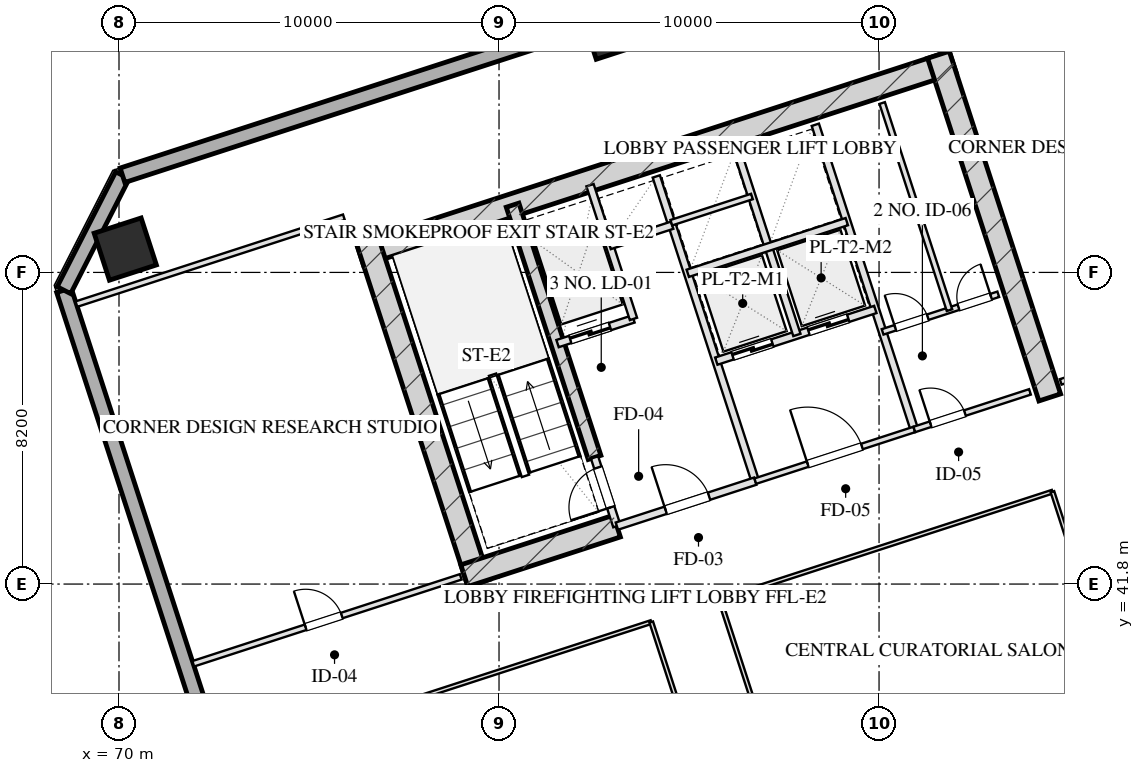
"""IFC4 building model, lengths in metres.
Left out: names, types, materials, properties, quantities, classifications, styles, units other than length and angle.
Written with IfcOpenShell. Run it as: python <this file> out.ifc"""

import sys

from ifc_helpers import new_model, si_unit, direction, frame, frame_2d, origin, origin_2d, place, context, subcontext, project, spatial, rectangle, hollow_rectangle, extrude, element, fill, save


model = new_model("IFC4")
c1 = context("Model", 3, precision=1e-05, world=origin(), true_north=direction((0.0, 1.0)))
c2 = subcontext(c1, "Body", "Model", "MODEL_VIEW")
j1 = project(units=[si_unit("LENGTHUNIT", "METRE"), si_unit("PLANEANGLEUNIT", "RADIAN")], contexts=[c1])
p1 = place(None, origin())
s1 = spatial("IfcSite", under=j1, at=p1, CompositionType="ELEMENT")
p2 = place(p1, origin())
s2 = spatial("IfcBuilding", under=s1, at=p2, CompositionType="ELEMENT")
p3 = place(p2, frame((0.0, 0.0, 134.55)))
s3 = spatial("IfcBuildingStorey", under=s2, at=p3, CompositionType="ELEMENT", Elevation=134.55)
p4 = place(p3, frame((76.344, 50.466, 0.0), z_axis=(0.0, 0.0, 1.0), x_axis=(0.951055727519, 0.309019421968, 0.0)))
e1 = element("IfcWall", 1, at=p4, inside=s3, PredefinedType="SHEAR", context=c2, shape_type="SweptSolid", body=[
    extrude(rectangle(XDim=16.4, YDim=0.6, at=frame_2d((8.2, 0.0))), origin(), (0.0, 0.0, 1.0), 3.45),
])
for number, where, z_axis, x_axis in (
    (2, (79.466, 41.828, 0.0), (0.0, 0.0, 1.0), (-0.309, 0.951, 0.0)),
    (3, (94.492, 46.71, 0.0), (0.0, 0.0, 1.0), (-0.309, 0.951, 0.0)),
):
    element("IfcWall", number, at=place(p3, frame(where, z_axis=z_axis, x_axis=x_axis)), inside=s3, PredefinedType="SHEAR", context=c2, shape_type="SweptSolid", body=[
        extrude(rectangle(XDim=9.48, YDim=0.6, at=frame_2d((4.74, 0.0))), origin(), (0.0, 0.0, 1.0), 3.45),
    ])
p5 = place(p3, frame((82.514, 45.131, 0.0), z_axis=(0.0, 0.0, 1.0), x_axis=(-0.308988790936, 0.951065679686, 0.0)))
e4 = element("IfcWall", 4, at=p5, inside=s3, PredefinedType="SHEAR", context=c2, shape_type="SweptSolid", body=[
    extrude(rectangle(XDim=6.98, YDim=0.35, at=frame_2d((3.49, 0.0))), origin(), (0.0, 0.0, 1.0), 3.45),
])
p6 = place(p3, frame((79.087, 42.021, 0.0), z_axis=(0.0, 0.0, 1.0), x_axis=(0.951062550203, 0.3089984233, 0.0)))
e5 = element("IfcWall", 5, at=p6, inside=s3, PredefinedType="SHEAR", context=c2, shape_type="SweptSolid", body=[
    extrude(rectangle(XDim=4.22, YDim=0.6, at=frame_2d((2.11, 0.0))), origin(), (0.0, 0.0, 1.0), 3.45),
])
p7 = place(p3, frame((70.165, 50.614, 0.0), z_axis=(0.0, 0.0, 1.0), x_axis=(0.951056516295, 0.309016994375, 0.0)))
e6 = element("IfcColumn", 6, at=p7, inside=s3, PredefinedType="COLUMN", context=c2, shape_type="SweptSolid", body=[
    extrude(hollow_rectangle(XDim=1.3, YDim=1.3, WallThickness=0.045, at=origin_2d()), origin(), (0.0, 0.0, 1.0), 3.451),
])
p8 = place(p3, frame((82.815, 56.112, 0.0), z_axis=(0.0, 0.0, 1.0), x_axis=(0.951056516295, 0.309016994375, 0.0)))
e7 = element("IfcColumn", 7, at=p8, inside=s3, PredefinedType="COLUMN", context=c2, shape_type="SweptSolid", body=[
    extrude(hollow_rectangle(XDim=0.8, YDim=0.8, WallThickness=0.028, at=origin_2d()), origin(), (0.0, 0.0, 1.0), 3.451),
])
p9 = place(p3, frame((81.776, 8.827, 0.0), z_axis=(0.0, 0.0, 1.0), x_axis=(-0.309014228706, 0.951057414911, 0.0)))
e8 = element("IfcWall", 8, at=p9, inside=s3, PredefinedType="SOLIDWALL", context=c2, shape_type="SweptSolid", body=[
    extrude(rectangle(XDim=42.8, YDim=0.4, at=frame_2d((21.4, 0.0))), origin(), (0.0, 0.0, 1.0), 2.55),
])
p10 = place(p9, frame((13.875, 0.0, 0.75)))
e9 = element("IfcOpeningElement", 9, at=p10, cuts=e8, PredefinedType="OPENING", context=c2, shape_type="SweptSolid", body=[
    extrude(rectangle(XDim=2.25, YDim=1.4, at=frame_2d((1.125, 0.7))), frame((0.0, 0.21, 0.0), z_axis=(0.0, -1.0, 0.0), x_axis=(1.0, 0.0, 0.0)), (0.0, 0.0, 1.0), 0.42),
])
p11 = place(p9, frame((17.675, 0.0, 0.75)))
e10 = element("IfcOpeningElement", 10, at=p11, cuts=e8, PredefinedType="OPENING", context=c2, shape_type="SweptSolid", body=[
    extrude(rectangle(XDim=2.25, YDim=1.4, at=frame_2d((1.125, 0.7))), frame((0.0, 0.21, 0.0), z_axis=(0.0, -1.0, 0.0), x_axis=(1.0, 0.0, 0.0)), (0.0, 0.0, 1.0), 0.42),
])
p12 = place(p9, frame((25.25, 0.0, 0.0)))
e11 = element("IfcOpeningElement", 11, at=p12, cuts=e8, PredefinedType="OPENING", context=c2, shape_type="SweptSolid", body=[
    extrude(rectangle(XDim=1.1, YDim=2.15, at=frame_2d((0.55, 1.075))), frame((0.0, 0.21, 0.0), z_axis=(0.0, -1.0, 0.0), x_axis=(1.0, 0.0, 0.0)), (0.0, 0.0, 1.0), 0.42),
])
p13 = place(p3, frame((68.551, 49.532, 0.0), z_axis=(0.0, 0.0, 1.0), x_axis=(0.454019523198, 0.890991735402, 0.0)))
e12 = element("IfcWall", 12, at=p13, inside=s3, PredefinedType="SOLIDWALL", context=c2, shape_type="SweptSolid", body=[
    extrude(rectangle(XDim=3.394, YDim=0.4, at=frame_2d((1.697, 0.0))), origin(), (0.0, 0.0, 1.0), 2.55),
])
p14 = place(p3, frame((70.092, 52.556, 0.0), z_axis=(0.0, 0.0, 1.0), x_axis=(0.951057580055, 0.30901372044, 0.0)))
e13 = element("IfcWall", 13, at=p14, inside=s3, PredefinedType="SOLIDWALL", context=c2, shape_type="SweptSolid", body=[
    extrude(rectangle(XDim=26.4, YDim=0.4, at=frame_2d((13.2, 0.0))), origin(), (0.0, 0.0, 1.0), 2.55),
])
p15 = place(p3, frame((83.101, 43.324, 0.0), z_axis=(0.0, 0.0, 1.0), x_axis=(-0.309048298632, 0.951046344356, 0.0)))
e14 = element("IfcWall", 14, at=p15, inside=s3, PredefinedType="PARTITIONING", context=c2, shape_type="SweptSolid", body=[
    extrude(rectangle(XDim=1.9, YDim=0.2, at=frame_2d((0.95, 0.0))), origin(), (0.0, 0.0, 1.0), 3.155),
])
p16 = place(p15, frame((0.52, 0.0, 0.0)))
e15 = element("IfcOpeningElement", 15, at=p16, cuts=e14, PredefinedType="OPENING", context=c2, shape_type="SweptSolid", body=[
    extrude(rectangle(XDim=1.1, YDim=2.05, at=frame_2d((0.55, 1.025))), frame((0.0, 0.11, 0.0), z_axis=(0.0, -1.0, 0.0), x_axis=(1.0, 0.0, 0.0)), (0.0, 0.0, 1.0), 0.22),
])
p17 = place(p3, frame((86.743, 44.508, 0.0), z_axis=(0.0, 0.0, 1.0), x_axis=(-0.309016001439, 0.951056838919, 0.0)))
e16 = element("IfcWall", 16, at=p17, inside=s3, PredefinedType="PARTITIONING", context=c2, shape_type="SweptSolid", body=[
    extrude(rectangle(XDim=8.43, YDim=0.2, at=frame_2d((4.215, 0.0))), origin(), (0.0, 0.0, 1.0), 3.155),
])
p18 = place(p3, frame((83.101, 43.324, 0.0), z_axis=(0.0, 0.0, 1.0), x_axis=(0.951052804469, 0.309028417967, 0.0)))
e17 = element("IfcWall", 17, at=p18, inside=s3, PredefinedType="PARTITIONING", context=c2, shape_type="SweptSolid", body=[
    extrude(rectangle(XDim=3.83, YDim=0.2, at=frame_2d((1.915, 0.0))), origin(), (0.0, 0.0, 1.0), 3.155),
])
p19 = place(p18, frame((1.35, 0.0, 0.0)))
e18 = element("IfcOpeningElement", 18, at=p19, cuts=e17, PredefinedType="OPENING", context=c2, shape_type="SweptSolid", body=[
    extrude(rectangle(XDim=1.2, YDim=2.05, at=frame_2d((0.6, 1.025))), frame((0.0, 0.11, 0.0), z_axis=(0.0, -1.0, 0.0), x_axis=(1.0, 0.0, 0.0)), (0.0, 0.0, 1.0), 0.22),
])
p20 = place(p3, frame((81.54, 48.127, 0.0), z_axis=(0.0, 0.0, 1.0), x_axis=(0.951062257173, 0.308999325213, 0.0)))
e19 = element("IfcWall", 19, at=p20, inside=s3, PredefinedType="PARTITIONING", context=c2, shape_type="SweptSolid", body=[
    extrude(rectangle(XDim=2.1, YDim=0.2, at=frame_2d((1.05, 0.0))), origin(), (0.0, 0.0, 1.0), 3.155),
])
p21 = place(p20, frame((0.35, 0.0, 0.0)))
e20 = element("IfcOpeningElement", 20, at=p21, cuts=e19, PredefinedType="OPENING", context=c2, shape_type="SweptSolid", body=[
    extrude(rectangle(XDim=1.1, YDim=2.05, at=frame_2d((0.55, 1.025))), frame((0.0, 0.11, 0.0), z_axis=(0.0, -1.0, 0.0), x_axis=(1.0, 0.0, 0.0)), (0.0, 0.0, 1.0), 0.22),
])
p22 = place(p3, frame((83.538, 48.776, 0.0), z_axis=(0.0, 0.0, 1.0), x_axis=(-0.3089935693, 0.951064127245, 0.0)))
e21 = element("IfcWall", 21, at=p22, inside=s3, PredefinedType="PARTITIONING", context=c2, shape_type="SweptSolid", body=[
    extrude(rectangle(XDim=3.7, YDim=0.2, at=frame_2d((1.85, 0.0))), origin(), (0.0, 0.0, 1.0), 3.155),
])
p23 = place(p3, frame((82.91, 50.707, 0.0), z_axis=(0.0, 0.0, 1.0), x_axis=(0.951041328149, 0.309063734775, 0.0)))
e22 = element("IfcWall", 22, at=p23, inside=s3, PredefinedType="PARTITIONING", context=c2, shape_type="SweptSolid", body=[
    extrude(rectangle(XDim=1.73, YDim=0.2, at=frame_2d((0.865, 0.0))), origin(), (0.0, 0.0, 1.0), 3.155),
])
p24 = place(p3, frame((90.928, 45.868, 0.0), z_axis=(0.0, 0.0, 1.0), x_axis=(-0.309042196757, 0.951048327176, 0.0)))
e23 = element("IfcWall", 23, at=p24, inside=s3, PredefinedType="PARTITIONING", context=c2, shape_type="SweptSolid", body=[
    extrude(rectangle(XDim=8.43, YDim=0.2, at=frame_2d((4.215, 0.0))), origin(), (0.0, 0.0, 1.0), 3.155),
])
p25 = place(p3, frame((86.743, 44.508, 0.0), z_axis=(0.0, 0.0, 1.0), x_axis=(0.951063829732, 0.308994485023, 0.0)))
e24 = element("IfcWall", 24, at=p25, inside=s3, PredefinedType="PARTITIONING", context=c2, shape_type="SweptSolid", body=[
    extrude(rectangle(XDim=4.4, YDim=0.15, at=frame_2d((2.2, 0.0))), origin(), (0.0, 0.0, 1.0), 3.155),
])
p26 = place(p25, frame((1.45, 0.0, 0.0)))
e25 = element("IfcOpeningElement", 25, at=p26, cuts=e24, PredefinedType="OPENING", context=c2, shape_type="SweptSolid", body=[
    extrude(rectangle(XDim=1.5, YDim=2.05, at=frame_2d((0.75, 1.025))), frame((0.0, 0.085, 0.0), z_axis=(0.0, -1.0, 0.0), x_axis=(1.0, 0.0, 0.0)), (0.0, 0.0, 1.0), 0.17),
])
p27 = place(p3, frame((85.718, 47.666, 0.0), z_axis=(0.0, 0.0, 1.0), x_axis=(0.951058531764, 0.30901079133, 0.0)))
e26 = element("IfcWall", 26, at=p27, inside=s3, PredefinedType="PARTITIONING", context=c2, shape_type="SweptSolid", body=[
    extrude(rectangle(XDim=4.4, YDim=0.2, at=frame_2d((2.2, 0.0))), origin(), (0.0, 0.0, 1.0), 3.155),
])
p28 = place(p27, frame((0.45, 0.0, 0.0)))
e27 = element("IfcOpeningElement", 27, at=p28, cuts=e26, PredefinedType="OPENING", context=c2, shape_type="SweptSolid", body=[
    extrude(rectangle(XDim=1.1, YDim=2.05, at=frame_2d((0.55, 1.025))), frame((0.0, 0.11, 0.0), z_axis=(0.0, -1.0, 0.0), x_axis=(1.0, 0.0, 0.0)), (0.0, 0.0, 1.0), 0.22),
])
p29 = place(p27, frame((2.55, 0.0, 0.0)))
e28 = element("IfcOpeningElement", 28, at=p29, cuts=e26, PredefinedType="OPENING", context=c2, shape_type="SweptSolid", body=[
    extrude(rectangle(XDim=1.1, YDim=2.05, at=frame_2d((0.55, 1.025))), frame((0.0, 0.11, 0.0), z_axis=(0.0, -1.0, 0.0), x_axis=(1.0, 0.0, 0.0)), (0.0, 0.0, 1.0), 0.22),
])
p30 = place(p3, frame((87.838, 48.354, 0.0), z_axis=(0.0, 0.0, 1.0), x_axis=(-0.3090093719, 0.951058992953, 0.0)))
e29 = element("IfcWall", 29, at=p30, inside=s3, PredefinedType="PARTITIONING", context=c2, shape_type="SweptSolid", body=[
    extrude(rectangle(XDim=5.11, YDim=0.2, at=frame_2d((2.555, 0.0))), origin(), (0.0, 0.0, 1.0), 3.155),
])
p31 = place(p3, frame((84.967, 49.977, 0.0), z_axis=(0.0, 0.0, 1.0), x_axis=(0.951063829732, 0.308994485023, 0.0)))
e30 = element("IfcWall", 30, at=p31, inside=s3, PredefinedType="PARTITIONING", context=c2, shape_type="SweptSolid", body=[
    extrude(rectangle(XDim=4.4, YDim=0.2, at=frame_2d((2.2, 0.0))), origin(), (0.0, 0.0, 1.0), 3.155),
])
p32 = place(p3, frame((84.534, 51.308, 0.0), z_axis=(0.0, 0.0, 1.0), x_axis=(0.951075093106, 0.308959814982, 0.0)))
e31 = element("IfcWall", 31, at=p32, inside=s3, PredefinedType="PARTITIONING", context=c2, shape_type="SweptSolid", body=[
    extrude(rectangle(XDim=2.23, YDim=0.15, at=frame_2d((1.115, 0.0))), origin(), (0.0, 0.0, 1.0), 3.155),
])
p33 = place(p3, frame((90.928, 45.868, 0.0), z_axis=(0.0, 0.0, 1.0), x_axis=(0.951059297078, 0.309008435874, 0.0)))
e32 = element("IfcWall", 32, at=p33, inside=s3, PredefinedType="PARTITIONING", context=c2, shape_type="SweptSolid", body=[
    extrude(rectangle(XDim=3.2, YDim=0.15, at=frame_2d((1.6, 0.0))), origin(), (0.0, 0.0, 1.0), 3.155),
])
p34 = place(p33, frame((0.45, 0.0, 0.0)))
e33 = element("IfcOpeningElement", 33, at=p34, cuts=e32, PredefinedType="OPENING", context=c2, shape_type="SweptSolid", body=[
    extrude(rectangle(XDim=0.95, YDim=2.05, at=frame_2d((0.475, 1.025))), frame((0.0, 0.085, 0.0), z_axis=(0.0, -1.0, 0.0), x_axis=(1.0, 0.0, 0.0)), (0.0, 0.0, 1.0), 0.17),
])
p35 = place(p3, frame((90.094, 48.436, 0.0), z_axis=(0.0, 0.0, 1.0), x_axis=(0.951066581729, 0.308986014439, 0.0)))
e34 = element("IfcWall", 34, at=p35, inside=s3, PredefinedType="PARTITIONING", context=c2, shape_type="SweptSolid", body=[
    extrude(rectangle(XDim=3.2, YDim=0.15, at=frame_2d((1.6, 0.0))), origin(), (0.0, 0.0, 1.0), 3.155),
])
p36 = place(p35, frame((0.35, 0.0, 0.0)))
e35 = element("IfcOpeningElement", 35, at=p36, cuts=e34, PredefinedType="OPENING", context=c2, shape_type="SweptSolid", body=[
    extrude(rectangle(XDim=0.9, YDim=2.05, at=frame_2d((0.45, 1.025))), frame((0.0, 0.085, 0.0), z_axis=(0.0, -1.0, 0.0), x_axis=(1.0, 0.0, 0.0)), (0.0, 0.0, 1.0), 0.17),
])
p37 = place(p35, frame((2.1, 0.0, 0.0)))
e36 = element("IfcOpeningElement", 36, at=p37, cuts=e34, PredefinedType="OPENING", context=c2, shape_type="SweptSolid", body=[
    extrude(rectangle(XDim=0.9, YDim=2.05, at=frame_2d((0.45, 1.025))), frame((0.0, 0.085, 0.0), z_axis=(0.0, -1.0, 0.0), x_axis=(1.0, 0.0, 0.0)), (0.0, 0.0, 1.0), 0.17),
])
p38 = place(p3, frame((91.853, 49.007, 0.0), z_axis=(0.0, 0.0, 1.0), x_axis=(-0.309022487551, 0.951054731437, 0.0)))
e37 = element("IfcWall", 37, at=p38, inside=s3, PredefinedType="PARTITIONING", context=c2, shape_type="SweptSolid", body=[
    extrude(rectangle(XDim=5.73, YDim=0.15, at=frame_2d((2.865, 0.0))), origin(), (0.0, 0.0, 1.0), 3.155),
])
p39 = place(p3, frame((68.88, 49.166, 0.0), z_axis=(0.0, 0.0, 1.0), x_axis=(0.951060977215, 0.309003264738, 0.0)))
e38 = element("IfcWall", 38, at=p39, inside=s3, PredefinedType="PARTITIONING", context=c2, shape_type="SweptSolid", body=[
    extrude(rectangle(XDim=7.4, YDim=0.15, at=frame_2d((3.7, 0.0))), origin(), (0.0, 0.0, 1.0), 3.155),
])
p40 = place(p3, frame((71.955, 39.703, 0.0), z_axis=(0.0, 0.0, 1.0), x_axis=(0.951060977215, 0.309003264738, 0.0)))
e39 = element("IfcWall", 39, at=p40, inside=s3, PredefinedType="PARTITIONING", context=c2, shape_type="SweptSolid", body=[
    extrude(rectangle(XDim=7.4, YDim=0.15, at=frame_2d((3.7, 0.0))), origin(), (0.0, 0.0, 1.0), 3.155),
])
p41 = place(p40, frame((3.108, 0.0, 0.0)))
e40 = element("IfcOpeningElement", 40, at=p41, cuts=e39, PredefinedType="OPENING", context=c2, shape_type="SweptSolid", body=[
    extrude(rectangle(XDim=1.0, YDim=2.05, at=frame_2d((0.5, 1.025))), frame((0.0, 0.085, 0.0), z_axis=(0.0, -1.0, 0.0), x_axis=(1.0, 0.0, 0.0)), (0.0, 0.0, 1.0), 0.17),
])
p42 = place(p3, frame((94.78, 47.119, 0.0), z_axis=(0.0, 0.0, 1.0), x_axis=(0.951057811516, 0.309013008068, 0.0)))
e41 = element("IfcWall", 41, at=p42, inside=s3, PredefinedType="PARTITIONING", context=c2, shape_type="SweptSolid", body=[
    extrude(rectangle(XDim=6.8, YDim=0.15, at=frame_2d((3.4, 0.0))), origin(), (0.0, 0.0, 1.0), 3.155),
])
p43 = place(p42, frame((2.856, 0.0, 0.0)))
e42 = element("IfcOpeningElement", 42, at=p43, cuts=e41, PredefinedType="OPENING", context=c2, shape_type="SweptSolid", body=[
    extrude(rectangle(XDim=1.05, YDim=2.05, at=frame_2d((0.525, 1.025))), frame((0.0, 0.085, 0.0), z_axis=(0.0, -1.0, 0.0), x_axis=(1.0, 0.0, 0.0)), (0.0, 0.0, 1.0), 0.17),
])
p44 = place(p3, frame((72.783, 37.154, 0.0), z_axis=(0.0, 0.0, 1.0), x_axis=(0.951053984761, 0.309024785528, 0.0)))
e43 = element("IfcWall", 43, at=p44, inside=s3, PredefinedType="MOVABLE", context=c2, shape_type="SweptSolid", body=[
    extrude(rectangle(XDim=11.8, YDim=0.1, at=frame_2d((5.9, 0.0))), origin(), (0.0, 0.0, 1.0), 3.155),
])
p45 = place(p3, frame((85.812, 41.387, 0.0), z_axis=(0.0, 0.0, 1.0), x_axis=(0.951054933035, 0.309021867106, 0.0)))
e44 = element("IfcWall", 44, at=p45, inside=s3, PredefinedType="MOVABLE", context=c2, shape_type="SweptSolid", body=[
    extrude(rectangle(XDim=9.2, YDim=0.1, at=frame_2d((4.6, 0.0))), origin(), (0.0, 0.0, 1.0), 3.155),
])
p46 = place(p3, frame((89.147, 24.975, 0.0), z_axis=(0.0, 0.0, 1.0), x_axis=(-0.309022042254, 0.951054876125, 0.0)))
e45 = element("IfcWall", 45, at=p46, inside=s3, PredefinedType="MOVABLE", context=c2, shape_type="SweptSolid", body=[
    extrude(rectangle(XDim=16.64, YDim=0.1, at=frame_2d((8.32, 0.0))), origin(), (0.0, 0.0, 1.0), 3.155),
])
p47 = place(p46, frame((3.32, 0.0, 0.0)))
e46 = element("IfcOpeningElement", 46, at=p47, cuts=e45, PredefinedType="OPENING", context=c2, shape_type="SweptSolid", body=[
    extrude(rectangle(XDim=1.0, YDim=2.05, at=frame_2d((0.5, 1.025))), frame((0.0, 0.06, 0.0), z_axis=(0.0, -1.0, 0.0), x_axis=(1.0, 0.0, 0.0)), (0.0, 0.0, 1.0), 0.12),
])
p48 = place(p46, frame((11.64, 0.0, 0.0)))
e47 = element("IfcOpeningElement", 47, at=p48, cuts=e45, PredefinedType="OPENING", context=c2, shape_type="SweptSolid", body=[
    extrude(rectangle(XDim=1.0, YDim=2.05, at=frame_2d((0.5, 1.025))), frame((0.0, 0.06, 0.0), z_axis=(0.0, -1.0, 0.0), x_axis=(1.0, 0.0, 0.0)), (0.0, 0.0, 1.0), 0.12),
])
p49 = place(p3, frame((90.954, 25.562, 0.0), z_axis=(0.0, 0.0, 1.0), x_axis=(-0.30901773025, 0.951056277195, 0.0)))
e48 = element("IfcWall", 48, at=p49, inside=s3, PredefinedType="MOVABLE", context=c2, shape_type="SweptSolid", body=[
    extrude(rectangle(XDim=16.64, YDim=0.1, at=frame_2d((8.32, 0.0))), origin(), (0.0, 0.0, 1.0), 3.155),
])
p50 = place(p49, frame((4.284, 0.0, 0.0)))
e49 = element("IfcOpeningElement", 49, at=p50, cuts=e48, PredefinedType="OPENING", context=c2, shape_type="SweptSolid", body=[
    extrude(rectangle(XDim=1.1, YDim=2.05, at=frame_2d((0.55, 1.025))), frame((0.0, 0.06, 0.0), z_axis=(0.0, -1.0, 0.0), x_axis=(1.0, 0.0, 0.0)), (0.0, 0.0, 1.0), 0.12),
])
p51 = place(p49, frame((12.724, 0.0, 0.0)))
e50 = element("IfcOpeningElement", 50, at=p51, cuts=e48, PredefinedType="OPENING", context=c2, shape_type="SweptSolid", body=[
    extrude(rectangle(XDim=1.1, YDim=2.05, at=frame_2d((0.55, 1.025))), frame((0.0, 0.06, 0.0), z_axis=(0.0, -1.0, 0.0), x_axis=(1.0, 0.0, 0.0)), (0.0, 0.0, 1.0), 0.12),
])
p52 = place(p3, frame((99.704, 28.405, 0.0), z_axis=(0.0, 0.0, 1.0), x_axis=(-0.309004459387, 0.951060589068, 0.0)))
e51 = element("IfcWall", 51, at=p52, inside=s3, PredefinedType="MOVABLE", context=c2, shape_type="SweptSolid", body=[
    extrude(rectangle(XDim=16.64, YDim=0.1, at=frame_2d((8.32, 0.0))), origin(), (0.0, 0.0, 1.0), 3.155),
])
p53 = place(p16, origin())
e52 = element("IfcDoor", 52, at=p53, inside=s3, OperationType="SINGLE_SWING_LEFT", PredefinedType="DOOR", context=c2, shape_type="SweptSolid", body=[
    extrude(rectangle(XDim=1.1, YDim=2.05, at=frame_2d((0.55, 1.025))), frame((0.0, 0.025, 0.0), z_axis=(0.0, -1.0, 0.0), x_axis=(1.0, 0.0, 0.0)), (0.0, 0.0, 1.0), 0.05),
])
fill(e15, e52)
p54 = place(p19, origin())
e53 = element("IfcDoor", 53, at=p54, inside=s3, OperationType="SINGLE_SWING_LEFT", PredefinedType="DOOR", context=c2, shape_type="SweptSolid", body=[
    extrude(rectangle(XDim=1.2, YDim=2.05, at=frame_2d((0.6, 1.025))), frame((0.0, 0.025, 0.0), z_axis=(0.0, -1.0, 0.0), x_axis=(1.0, 0.0, 0.0)), (0.0, 0.0, 1.0), 0.05),
])
fill(e18, e53)
p55 = place(p21, origin())
e54 = element("IfcDoor", 54, at=p55, inside=s3, OperationType="DOUBLE_DOOR_SLIDING", PredefinedType="DOOR", context=c2, shape_type="SweptSolid", body=[
    extrude(rectangle(XDim=1.1, YDim=2.05, at=frame_2d((0.55, 1.025))), frame((0.0, 0.025, 0.0), z_axis=(0.0, -1.0, 0.0), x_axis=(1.0, 0.0, 0.0)), (0.0, 0.0, 1.0), 0.05),
])
fill(e20, e54)
p56 = place(p26, origin())
e55 = element("IfcDoor", 55, at=p56, inside=s3, OperationType="SINGLE_SWING_LEFT", PredefinedType="DOOR", context=c2, shape_type="SweptSolid", body=[
    extrude(rectangle(XDim=1.5, YDim=2.05, at=frame_2d((0.75, 1.025))), frame((0.0, 0.025, 0.0), z_axis=(0.0, -1.0, 0.0), x_axis=(1.0, 0.0, 0.0)), (0.0, 0.0, 1.0), 0.05),
])
fill(e25, e55)
p57 = place(p28, origin())
e56 = element("IfcDoor", 56, at=p57, inside=s3, OperationType="DOUBLE_DOOR_SLIDING", PredefinedType="DOOR", context=c2, shape_type="SweptSolid", body=[
    extrude(rectangle(XDim=1.1, YDim=2.05, at=frame_2d((0.55, 1.025))), frame((0.0, 0.025, 0.0), z_axis=(0.0, -1.0, 0.0), x_axis=(1.0, 0.0, 0.0)), (0.0, 0.0, 1.0), 0.05),
])
fill(e27, e56)
p58 = place(p29, origin())
e57 = element("IfcDoor", 57, at=p58, inside=s3, OperationType="DOUBLE_DOOR_SLIDING", PredefinedType="DOOR", context=c2, shape_type="SweptSolid", body=[
    extrude(rectangle(XDim=1.1, YDim=2.05, at=frame_2d((0.55, 1.025))), frame((0.0, 0.025, 0.0), z_axis=(0.0, -1.0, 0.0), x_axis=(1.0, 0.0, 0.0)), (0.0, 0.0, 1.0), 0.05),
])
fill(e28, e57)
p59 = place(p34, origin())
e58 = element("IfcDoor", 58, at=p59, inside=s3, OperationType="SINGLE_SWING_LEFT", PredefinedType="DOOR", context=c2, shape_type="SweptSolid", body=[
    extrude(rectangle(XDim=0.95, YDim=2.05, at=frame_2d((0.475, 1.025))), frame((0.0, 0.025, 0.0), z_axis=(0.0, -1.0, 0.0), x_axis=(1.0, 0.0, 0.0)), (0.0, 0.0, 1.0), 0.05),
])
fill(e33, e58)
p60 = place(p36, origin())
e59 = element("IfcDoor", 59, at=p60, inside=s3, OperationType="SINGLE_SWING_LEFT", PredefinedType="DOOR", context=c2, shape_type="SweptSolid", body=[
    extrude(rectangle(XDim=0.9, YDim=2.05, at=frame_2d((0.45, 1.025))), frame((0.0, 0.025, 0.0), z_axis=(0.0, -1.0, 0.0), x_axis=(1.0, 0.0, 0.0)), (0.0, 0.0, 1.0), 0.05),
])
fill(e35, e59)
p61 = place(p37, origin())
e60 = element("IfcDoor", 60, at=p61, inside=s3, OperationType="SINGLE_SWING_RIGHT", PredefinedType="DOOR", context=c2, shape_type="SweptSolid", body=[
    extrude(rectangle(XDim=0.9, YDim=2.05, at=frame_2d((0.45, 1.025))), frame((0.0, 0.025, 0.0), z_axis=(0.0, -1.0, 0.0), x_axis=(1.0, 0.0, 0.0)), (0.0, 0.0, 1.0), 0.05),
])
fill(e36, e60)
p62 = place(p41, origin())
e61 = element("IfcDoor", 61, at=p62, inside=s3, OperationType="SINGLE_SWING_LEFT", PredefinedType="DOOR", context=c2, shape_type="SweptSolid", body=[
    extrude(rectangle(XDim=1.0, YDim=2.05, at=frame_2d((0.5, 1.025))), frame((0.0, 0.025, 0.0), z_axis=(0.0, -1.0, 0.0), x_axis=(1.0, 0.0, 0.0)), (0.0, 0.0, 1.0), 0.05),
])
fill(e40, e61)
save(model, sys.argv[1])
